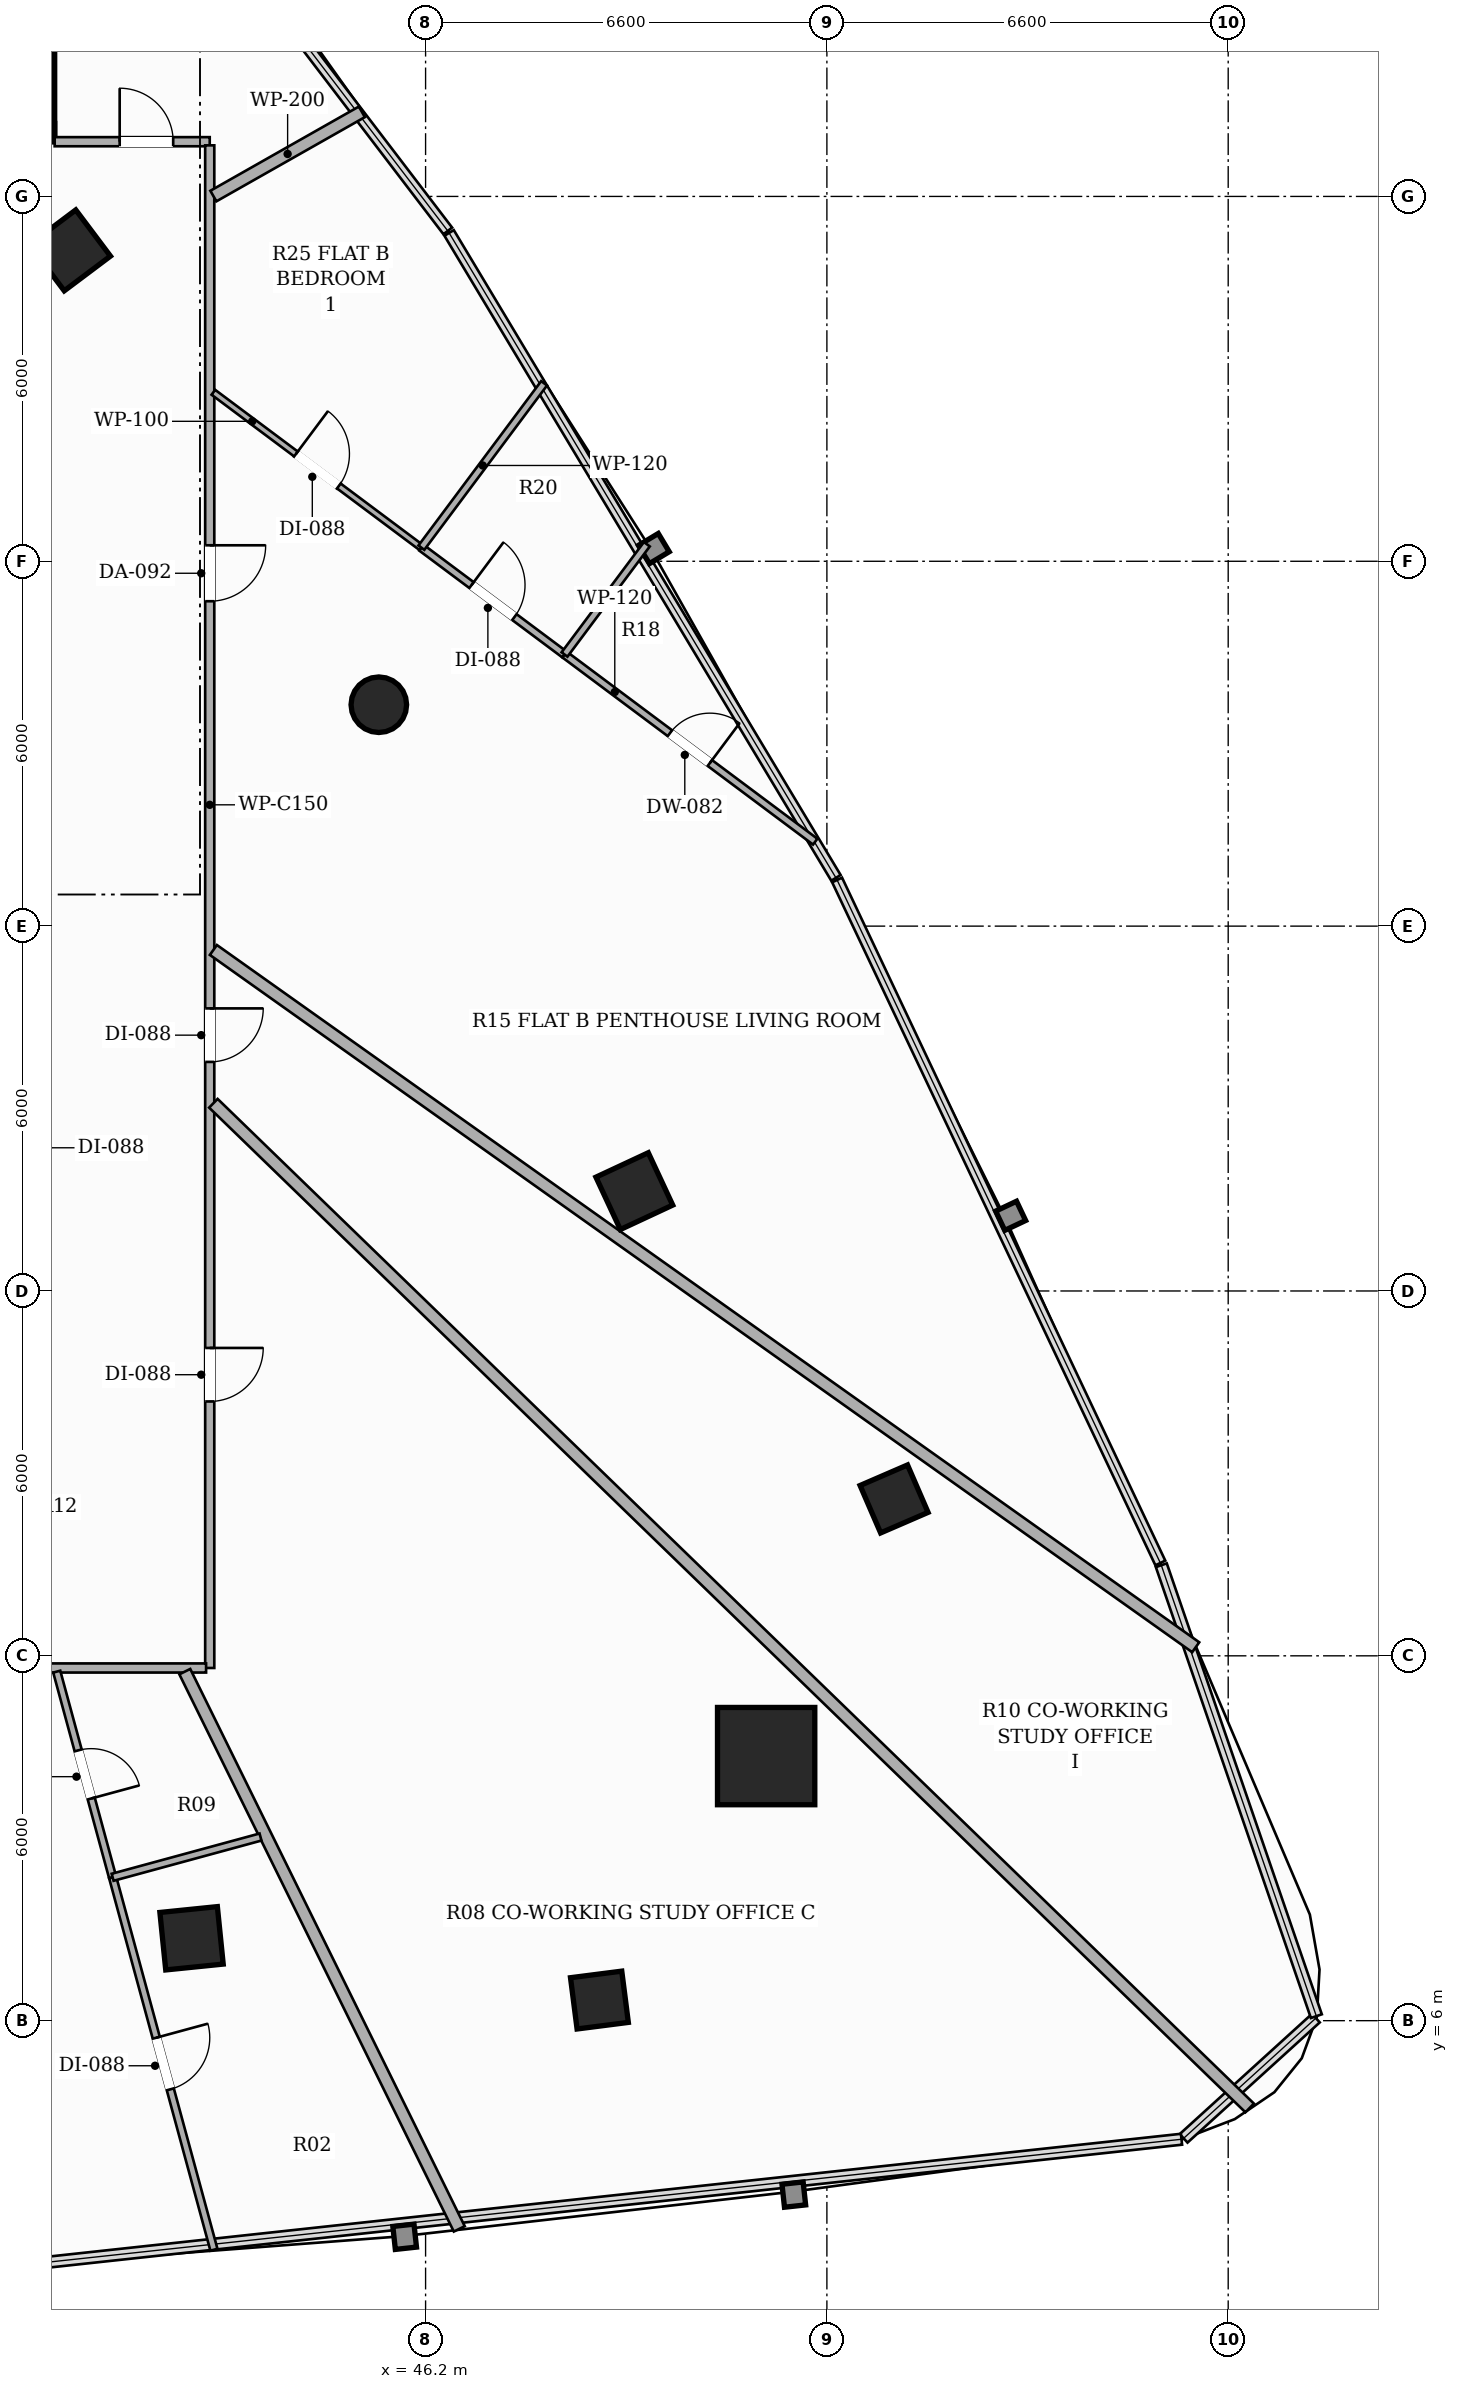
"""IFC4 building model, lengths in metres.
Left out: names, types, materials, properties, quantities, classifications, styles, units other than length and angle.
Written with IfcOpenShell. Run it as: python <this file> out.ifc"""

import sys

from ifc_helpers import new_model, si_unit, direction, frame, frame_2d, origin, origin_2d, place, context, subcontext, project, spatial, rectangle, hollow_rectangle, hollow_circle, extrude, element, fill, save


model = new_model("IFC4")
c1 = context("Model", 3, precision=1e-05, world=origin(), true_north=direction((0.0, 1.0)))
c2 = subcontext(c1, "Body", "Model", "MODEL_VIEW")
j1 = project(units=[si_unit("LENGTHUNIT", "METRE"), si_unit("PLANEANGLEUNIT", "RADIAN")], contexts=[c1])
p1 = place(None, origin())
s1 = spatial("IfcSite", under=j1, at=p1, CompositionType="ELEMENT")
p2 = place(p1, origin())
s2 = spatial("IfcBuilding", under=s1, at=p2, CompositionType="ELEMENT")
p3 = place(p2, frame((0.0, 0.0, 64.25)))
s3 = spatial("IfcBuildingStorey", under=s2, at=p3, CompositionType="ELEMENT", Elevation=64.25)
p4 = place(p3, frame((40.1, 37.05, 0.0), z_axis=(0.0, 0.0, 1.0), x_axis=(-1.0, 0.0, 0.0)))
e1 = element("IfcWall", 1, at=p4, inside=s3, PredefinedType="SHEAR", context=c2, shape_type="SweptSolid", body=[
    extrude(rectangle(XDim=14.2, YDim=0.3, at=frame_2d((7.1, 0.0))), origin(), (0.0, 0.0, 1.0), 3.3),
])
p5 = place(p4, frame((12.325, 0.0, 0.0)))
e2 = element("IfcOpeningElement", 2, at=p5, cuts=e1, PredefinedType="OPENING", context=c2, shape_type="SweptSolid", body=[
    extrude(rectangle(XDim=1.1, YDim=2.2, at=frame_2d((0.55, 1.1))), frame((0.0, 0.16, 0.0), z_axis=(0.0, -1.0, 0.0), x_axis=(1.0, 0.0, 0.0)), (0.0, 0.0, 1.0), 0.32),
])
p6 = place(p4, frame((0.775, 0.0, 0.0)))
e3 = element("IfcOpeningElement", 3, at=p6, cuts=e1, PredefinedType="OPENING", context=c2, shape_type="SweptSolid", body=[
    extrude(rectangle(XDim=1.1, YDim=2.2, at=frame_2d((0.55, 1.1))), frame((0.0, 0.16, 0.0), z_axis=(0.0, -1.0, 0.0), x_axis=(1.0, 0.0, 0.0)), (0.0, 0.0, 1.0), 0.32),
])
p7 = place(p3, frame((39.95, 36.9, 0.0), z_axis=(0.0, 0.0, 1.0), x_axis=(0.0, 1.0, 0.0)))
e4 = element("IfcWall", 4, at=p7, inside=s3, PredefinedType="SHEAR", context=c2, shape_type="SweptSolid", body=[
    extrude(rectangle(XDim=2.85, YDim=0.3, at=frame_2d((1.425, 0.0))), origin(), (0.0, 0.0, 1.0), 3.3),
])
p8 = place(p3, frame((51.801, 10.351, 0.0), z_axis=(0.0, 0.0, 1.0), x_axis=(1.0, 0.0, 0.0)))
e5 = element("IfcColumn", 5, at=p8, inside=s3, PredefinedType="COLUMN", context=c2, shape_type="SweptSolid", body=[
    extrude(hollow_rectangle(XDim=1.6, YDim=1.6, WallThickness=0.05, at=origin_2d()), origin(), (0.0, 0.0, 1.0), 3.3),
])
for number, where, z_axis, x_axis in (
    (6, (42.351, 7.355, 0.0), (0.0, 0.0, 1.0), (0.995, 0.101, 0.0)),
    (7, (49.633, 19.642, 0.0), (0.0, 0.0, 1.0), (-0.423, 0.906, 0.0)),
):
    element("IfcColumn", number, at=place(p3, frame(where, z_axis=z_axis, x_axis=x_axis)), inside=s3, PredefinedType="COLUMN", context=c2, shape_type="SweptSolid", body=[
        extrude(hollow_rectangle(XDim=0.95, YDim=0.95, WallThickness=0.032, at=origin_2d()), origin(), (0.0, 0.0, 1.0), 3.3),
    ])
p9 = place(p3, frame((45.431, 27.641, 0.0), z_axis=(0.0, 0.0, 1.0), x_axis=(1.0, 0.0, 0.0)))
e8 = element("IfcColumn", 8, at=p9, inside=s3, PredefinedType="COLUMN", context=c2, shape_type="SweptSolid", body=[
    extrude(hollow_circle(Radius=0.457, WallThickness=0.025, at=origin_2d()), origin(), (0.0, 0.0, 1.0), 3.3),
])
p10 = place(p3, frame((40.352, 35.113, 0.0), z_axis=(0.0, 0.0, 1.0), x_axis=(-0.600420225326, 0.799684658487, 0.0)))
e9 = element("IfcColumn", 9, at=p10, inside=s3, PredefinedType="COLUMN", context=c2, shape_type="SweptSolid", body=[
    extrude(hollow_rectangle(XDim=0.95, YDim=0.95, WallThickness=0.032, at=origin_2d()), origin(), (0.0, 0.0, 1.0), 3.3),
])
for number, where, z_axis, x_axis in (
    (10, (49.059, 6.339, 0.0), (0.0, 0.0, 1.0), (0.992, 0.127, 0.0)),
    (11, (53.905, 14.58, 0.0), (0.0, 0.0, 1.0), (-0.397, 0.918, 0.0)),
):
    element("IfcColumn", number, at=place(p3, frame(where, z_axis=z_axis, x_axis=x_axis)), inside=s3, PredefinedType="COLUMN", context=c2, shape_type="SweptSolid", body=[
        extrude(hollow_rectangle(XDim=0.85, YDim=0.85, WallThickness=0.028, at=origin_2d()), origin(), (0.0, 0.0, 1.0), 3.3),
    ])
p11 = place(p3, frame((40.1, 36.9, 0.0), z_axis=(0.0, 0.0, 1.0), x_axis=(1.0, 0.0, 0.0)))
e12 = element("IfcWall", 12, at=p11, inside=s3, PredefinedType="PARTITIONING", context=c2, shape_type="SweptSolid", body=[
    extrude(rectangle(XDim=2.55, YDim=0.15, at=frame_2d((1.275, 0.0))), origin(), (0.0, 0.0, 1.0), 2.413),
])
p12 = place(p11, frame((1.069, 0.0, 0.0)))
e13 = element("IfcOpeningElement", 13, at=p12, cuts=e12, PredefinedType="OPENING", context=c2, shape_type="SweptSolid", body=[
    extrude(rectangle(XDim=0.88, YDim=2.1, at=frame_2d((0.44, 1.05))), frame((0.0, 0.085, 0.0), z_axis=(0.0, -1.0, 0.0), x_axis=(1.0, 0.0, 0.0)), (0.0, 0.0, 1.0), 0.17),
])
p13 = place(p3, frame((42.65, 36.84, 0.0), z_axis=(0.0, 0.0, 1.0), x_axis=(0.0, -1.0, 0.0)))
e14 = element("IfcWall", 14, at=p13, inside=s3, PredefinedType="PARTITIONING", context=c2, shape_type="SweptSolid", body=[
    extrude(rectangle(XDim=25.04, YDim=0.15, at=frame_2d((12.52, 0.0))), origin(), (0.0, 0.0, 1.0), 2.413),
])
p14 = place(p13, frame((6.577, 0.0, 0.0)))
e15 = element("IfcOpeningElement", 15, at=p14, cuts=e14, PredefinedType="OPENING", context=c2, shape_type="SweptSolid", body=[
    extrude(rectangle(XDim=0.92, YDim=2.15, at=frame_2d((0.46, 1.075))), frame((0.0, 0.085, 0.0), z_axis=(0.0, -1.0, 0.0), x_axis=(1.0, 0.0, 0.0)), (0.0, 0.0, 1.0), 0.17),
])
p15 = place(p13, frame((19.777, 0.0, 0.0)))
e16 = element("IfcOpeningElement", 16, at=p15, cuts=e14, PredefinedType="OPENING", context=c2, shape_type="SweptSolid", body=[
    extrude(rectangle(XDim=0.88, YDim=2.1, at=frame_2d((0.44, 1.05))), frame((0.0, 0.085, 0.0), z_axis=(0.0, -1.0, 0.0), x_axis=(1.0, 0.0, 0.0)), (0.0, 0.0, 1.0), 0.17),
])
p16 = place(p13, frame((14.193, 0.0, 0.0)))
e17 = element("IfcOpeningElement", 17, at=p16, cuts=e14, PredefinedType="OPENING", context=c2, shape_type="SweptSolid", body=[
    extrude(rectangle(XDim=0.88, YDim=2.1, at=frame_2d((0.44, 1.05))), frame((0.0, 0.085, 0.0), z_axis=(0.0, -1.0, 0.0), x_axis=(1.0, 0.0, 0.0)), (0.0, 0.0, 1.0), 0.17),
])
p17 = place(p3, frame((42.59, 11.8, 0.0), z_axis=(0.0, 0.0, 1.0), x_axis=(-1.0, 0.0, 0.0)))
e18 = element("IfcWall", 18, at=p17, inside=s3, PredefinedType="PARTITIONING", context=c2, shape_type="SweptSolid", body=[
    extrude(rectangle(XDim=19.24, YDim=0.15, at=frame_2d((9.62, 0.0))), origin(), (0.0, 0.0, 1.0), 2.669),
])
p18 = place(p17, frame((11.489, 0.0, 0.0)))
e19 = element("IfcOpeningElement", 19, at=p18, cuts=e18, PredefinedType="OPENING", context=c2, shape_type="SweptSolid", body=[
    extrude(rectangle(XDim=0.92, YDim=2.15, at=frame_2d((0.46, 1.075))), frame((0.0, 0.085, 0.0), z_axis=(0.0, -1.0, 0.0), x_axis=(1.0, 0.0, 0.0)), (0.0, 0.0, 1.0), 0.17),
])
p19 = place(p17, frame((3.787, 0.0, 0.0)))
e20 = element("IfcOpeningElement", 20, at=p19, cuts=e18, PredefinedType="OPENING", context=c2, shape_type="SweptSolid", body=[
    extrude(rectangle(XDim=0.92, YDim=2.15, at=frame_2d((0.46, 1.075))), frame((0.0, 0.085, 0.0), z_axis=(0.0, -1.0, 0.0), x_axis=(1.0, 0.0, 0.0)), (0.0, 0.0, 1.0), 0.17),
])
p20 = place(p3, frame((45.152, 37.391, 0.0), z_axis=(0.0, 0.0, 1.0), x_axis=(-0.86984931175, -0.4933175193, 0.0)))
e21 = element("IfcWall", 21, at=p20, inside=s3, PredefinedType="PARTITIONING", context=c2, shape_type="SweptSolid", body=[
    extrude(rectangle(XDim=2.808, YDim=0.2, at=frame_2d((1.404, 0.0))), origin(), (0.0, 0.0, 1.0), 2.619),
])
p21 = place(p3, frame((58.866, 12.141, 0.0), z_axis=(0.0, 0.0, 1.0), x_axis=(-0.815477500133, 0.578788775614, 0.0)))
e22 = element("IfcWall", 22, at=p21, inside=s3, PredefinedType="PARTITIONING", context=c2, shape_type="SweptSolid", body=[
    extrude(rectangle(XDim=19.812, YDim=0.2, at=frame_2d((9.906, 0.0))), origin(), (0.0, 0.0, 1.0), 2.413),
])
p22 = place(p3, frame((46.754, 2.576, 0.0), z_axis=(0.0, 0.0, 1.0), x_axis=(-0.441871352221, 0.897078429172, 0.0)))
e23 = element("IfcWall", 23, at=p22, inside=s3, PredefinedType="PARTITIONING", context=c2, shape_type="SweptSolid", body=[
    extrude(rectangle(XDim=10.215, YDim=0.2, at=frame_2d((5.108, 0.0))), origin(), (0.0, 0.0, 1.0), 2.413),
])
p23 = place(p3, frame((42.71, 21.087, 0.0), z_axis=(0.0, 0.0, 1.0), x_axis=(0.717996025824, -0.696047201633, 0.0)))
e24 = element("IfcWall", 24, at=p23, inside=s3, PredefinedType="PARTITIONING", context=c2, shape_type="SweptSolid", body=[
    extrude(rectangle(XDim=23.737, YDim=0.2, at=frame_2d((11.868, 0.0))), origin(), (0.0, 0.0, 1.0), 2.413),
])
p24 = place(p3, frame((48.485, 28.467, 0.0), z_axis=(0.0, 0.0, 1.0), x_axis=(0.80130205943, -0.598259984917, 0.0)))
e25 = element("IfcWall", 25, at=p24, inside=s3, PredefinedType="PARTITIONING", context=c2, shape_type="SweptSolid", body=[
    extrude(rectangle(XDim=5.145, YDim=0.12, at=frame_2d((2.573, 0.0))), origin(), (0.0, 0.0, 1.0), 3.06),
])
p25 = place(p24, frame((2.163, 0.0, 0.0)))
e26 = element("IfcOpeningElement", 26, at=p25, cuts=e25, PredefinedType="OPENING", context=c2, shape_type="SweptSolid", body=[
    extrude(rectangle(XDim=0.82, YDim=2.1, at=frame_2d((0.41, 1.05))), frame((0.0, 0.07, 0.0), z_axis=(0.0, -1.0, 0.0), x_axis=(1.0, 0.0, 0.0)), (0.0, 0.0, 1.0), 0.14),
])
p26 = place(p3, frame((46.131, 30.224, 0.0), z_axis=(0.0, 0.0, 1.0), x_axis=(0.801374244223, -0.598163289325, 0.0)))
e27 = element("IfcWall", 27, at=p26, inside=s3, PredefinedType="PARTITIONING", context=c2, shape_type="SweptSolid", body=[
    extrude(rectangle(XDim=2.938, YDim=0.12, at=frame_2d((1.469, 0.0))), origin(), (0.0, 0.0, 1.0), 3.06),
])
p27 = place(p26, frame((1.029, 0.0, 0.0)))
e28 = element("IfcOpeningElement", 28, at=p27, cuts=e27, PredefinedType="OPENING", context=c2, shape_type="SweptSolid", body=[
    extrude(rectangle(XDim=0.88, YDim=2.1, at=frame_2d((0.44, 1.05))), frame((0.0, 0.07, 0.0), z_axis=(0.0, -1.0, 0.0), x_axis=(1.0, 0.0, 0.0)), (0.0, 0.0, 1.0), 0.14),
])
p28 = place(p3, frame((42.71, 32.779, 0.0), z_axis=(0.0, 0.0, 1.0), x_axis=(0.801226493917, -0.598361183104, 0.0)))
e29 = element("IfcWall", 29, at=p28, inside=s3, PredefinedType="PARTITIONING", context=c2, shape_type="SweptSolid", body=[
    extrude(rectangle(XDim=4.27, YDim=0.1, at=frame_2d((2.135, 0.0))), origin(), (0.0, 0.0, 1.0), 3.06),
])
p29 = place(p28, frame((1.695, 0.0, 0.0)))
e30 = element("IfcOpeningElement", 30, at=p29, cuts=e29, PredefinedType="OPENING", context=c2, shape_type="SweptSolid", body=[
    extrude(rectangle(XDim=0.88, YDim=2.1, at=frame_2d((0.44, 1.05))), frame((0.0, 0.06, 0.0), z_axis=(0.0, -1.0, 0.0), x_axis=(1.0, 0.0, 0.0)), (0.0, 0.0, 1.0), 0.12),
])
p30 = place(p3, frame((48.485, 28.467, 0.0), z_axis=(0.0, 0.0, 1.0), x_axis=(0.59837605097, 0.801215390282, 0.0)))
e31 = element("IfcWall", 31, at=p30, inside=s3, PredefinedType="PARTITIONING", context=c2, shape_type="SweptSolid", body=[
    extrude(rectangle(XDim=2.263, YDim=0.12, at=frame_2d((1.131, 0.0))), origin(), (0.0, 0.0, 1.0), 3.06),
])
p31 = place(p3, frame((46.131, 30.224, 0.0), z_axis=(0.0, 0.0, 1.0), x_axis=(0.598226648312, 0.801326947787, 0.0)))
e32 = element("IfcWall", 32, at=p31, inside=s3, PredefinedType="PARTITIONING", context=c2, shape_type="SweptSolid", body=[
    extrude(rectangle(XDim=3.373, YDim=0.12, at=frame_2d((1.687, 0.0))), origin(), (0.0, 0.0, 1.0), 3.06),
])
p32 = place(p3, frame((40.134, 11.74, 0.0), z_axis=(0.0, 0.0, 1.0), x_axis=(0.262203658207, -0.965012560345, 0.0)))
e33 = element("IfcWall", 33, at=p32, inside=s3, PredefinedType="PARTITIONING", context=c2, shape_type="SweptSolid", body=[
    extrude(rectangle(XDim=3.505, YDim=0.12, at=frame_2d((1.752, 0.0))), origin(), (0.0, 0.0, 1.0), 3.06),
])
p33 = place(p32, frame((1.342, 0.0, 0.0)))
e34 = element("IfcOpeningElement", 34, at=p33, cuts=e33, PredefinedType="OPENING", context=c2, shape_type="SweptSolid", body=[
    extrude(rectangle(XDim=0.82, YDim=2.1, at=frame_2d((0.41, 1.05))), frame((0.0, 0.07, 0.0), z_axis=(0.0, -1.0, 0.0), x_axis=(1.0, 0.0, 0.0)), (0.0, 0.0, 1.0), 0.14),
])
p34 = place(p3, frame((41.053, 8.358, 0.0), z_axis=(0.0, 0.0, 1.0), x_axis=(0.262466446164, -0.964941119778, 0.0)))
e35 = element("IfcWall", 35, at=p34, inside=s3, PredefinedType="PARTITIONING", context=c2, shape_type="SweptSolid", body=[
    extrude(rectangle(XDim=6.348, YDim=0.12, at=frame_2d((3.174, 0.0))), origin(), (0.0, 0.0, 1.0), 2.413),
])
p35 = place(p34, frame((2.734, 0.0, 0.0)))
e36 = element("IfcOpeningElement", 36, at=p35, cuts=e35, PredefinedType="OPENING", context=c2, shape_type="SweptSolid", body=[
    extrude(rectangle(XDim=0.88, YDim=2.1, at=frame_2d((0.44, 1.05))), frame((0.0, 0.07, 0.0), z_axis=(0.0, -1.0, 0.0), x_axis=(1.0, 0.0, 0.0)), (0.0, 0.0, 1.0), 0.14),
])
p36 = place(p3, frame((43.485, 9.02, 0.0), z_axis=(0.0, 0.0, 1.0), x_axis=(-0.964884417827, -0.262674818425, 0.0)))
e37 = element("IfcWall", 37, at=p36, inside=s3, PredefinedType="PARTITIONING", context=c2, shape_type="SweptSolid", body=[
    extrude(rectangle(XDim=2.521, YDim=0.12, at=frame_2d((1.26, 0.0))), origin(), (0.0, 0.0, 1.0), 2.669),
])
p37 = place(p12, origin())
e38 = element("IfcDoor", 38, at=p37, inside=s3, OperationType="SINGLE_SWING_LEFT", PredefinedType="DOOR", context=c2, shape_type="SweptSolid", body=[
    extrude(rectangle(XDim=0.88, YDim=2.1, at=frame_2d((0.44, 1.05))), frame((0.0, 0.025, 0.0), z_axis=(0.0, -1.0, 0.0), x_axis=(1.0, 0.0, 0.0)), (0.0, 0.0, 1.0), 0.05),
])
fill(e13, e38)
p38 = place(p14, origin())
e39 = element("IfcDoor", 39, at=p38, inside=s3, OperationType="SINGLE_SWING_LEFT", PredefinedType="DOOR", context=c2, shape_type="SweptSolid", body=[
    extrude(rectangle(XDim=0.92, YDim=2.15, at=frame_2d((0.46, 1.075))), frame((0.0, 0.025, 0.0), z_axis=(0.0, -1.0, 0.0), x_axis=(1.0, 0.0, 0.0)), (0.0, 0.0, 1.0), 0.05),
])
fill(e15, e39)
p39 = place(p25, origin())
e40 = element("IfcDoor", 40, at=p39, inside=s3, OperationType="SINGLE_SWING_RIGHT", PredefinedType="DOOR", context=c2, shape_type="SweptSolid", body=[
    extrude(rectangle(XDim=0.82, YDim=2.1, at=frame_2d((0.41, 1.05))), frame((0.0, 0.025, 0.0), z_axis=(0.0, -1.0, 0.0), x_axis=(1.0, 0.0, 0.0)), (0.0, 0.0, 1.0), 0.05),
])
fill(e26, e40)
p40 = place(p27, origin())
e41 = element("IfcDoor", 41, at=p40, inside=s3, OperationType="SINGLE_SWING_LEFT", PredefinedType="DOOR", context=c2, shape_type="SweptSolid", body=[
    extrude(rectangle(XDim=0.88, YDim=2.1, at=frame_2d((0.44, 1.05))), frame((0.0, 0.025, 0.0), z_axis=(0.0, -1.0, 0.0), x_axis=(1.0, 0.0, 0.0)), (0.0, 0.0, 1.0), 0.05),
])
fill(e28, e41)
p41 = place(p29, origin())
e42 = element("IfcDoor", 42, at=p41, inside=s3, OperationType="SINGLE_SWING_LEFT", PredefinedType="DOOR", context=c2, shape_type="SweptSolid", body=[
    extrude(rectangle(XDim=0.88, YDim=2.1, at=frame_2d((0.44, 1.05))), frame((0.0, 0.025, 0.0), z_axis=(0.0, -1.0, 0.0), x_axis=(1.0, 0.0, 0.0)), (0.0, 0.0, 1.0), 0.05),
])
fill(e30, e42)
p42 = place(p15, origin())
e43 = element("IfcDoor", 43, at=p42, inside=s3, OperationType="SINGLE_SWING_LEFT", PredefinedType="DOOR", context=c2, shape_type="SweptSolid", body=[
    extrude(rectangle(XDim=0.88, YDim=2.1, at=frame_2d((0.44, 1.05))), frame((0.0, 0.025, 0.0), z_axis=(0.0, -1.0, 0.0), x_axis=(1.0, 0.0, 0.0)), (0.0, 0.0, 1.0), 0.05),
])
fill(e16, e43)
p43 = place(p33, origin())
e44 = element("IfcDoor", 44, at=p43, inside=s3, OperationType="SINGLE_SWING_RIGHT", PredefinedType="DOOR", context=c2, shape_type="SweptSolid", body=[
    extrude(rectangle(XDim=0.82, YDim=2.1, at=frame_2d((0.41, 1.05))), frame((0.0, 0.025, 0.0), z_axis=(0.0, -1.0, 0.0), x_axis=(1.0, 0.0, 0.0)), (0.0, 0.0, 1.0), 0.05),
])
fill(e34, e44)
p44 = place(p35, origin())
e45 = element("IfcDoor", 45, at=p44, inside=s3, OperationType="SINGLE_SWING_LEFT", PredefinedType="DOOR", context=c2, shape_type="SweptSolid", body=[
    extrude(rectangle(XDim=0.88, YDim=2.1, at=frame_2d((0.44, 1.05))), frame((0.0, 0.025, 0.0), z_axis=(0.0, -1.0, 0.0), x_axis=(1.0, 0.0, 0.0)), (0.0, 0.0, 1.0), 0.05),
])
fill(e36, e45)
p45 = place(p16, origin())
e46 = element("IfcDoor", 46, at=p45, inside=s3, OperationType="SINGLE_SWING_LEFT", PredefinedType="DOOR", context=c2, shape_type="SweptSolid", body=[
    extrude(rectangle(XDim=0.88, YDim=2.1, at=frame_2d((0.44, 1.05))), frame((0.0, 0.025, 0.0), z_axis=(0.0, -1.0, 0.0), x_axis=(1.0, 0.0, 0.0)), (0.0, 0.0, 1.0), 0.05),
])
fill(e17, e46)
save(model, sys.argv[1])
